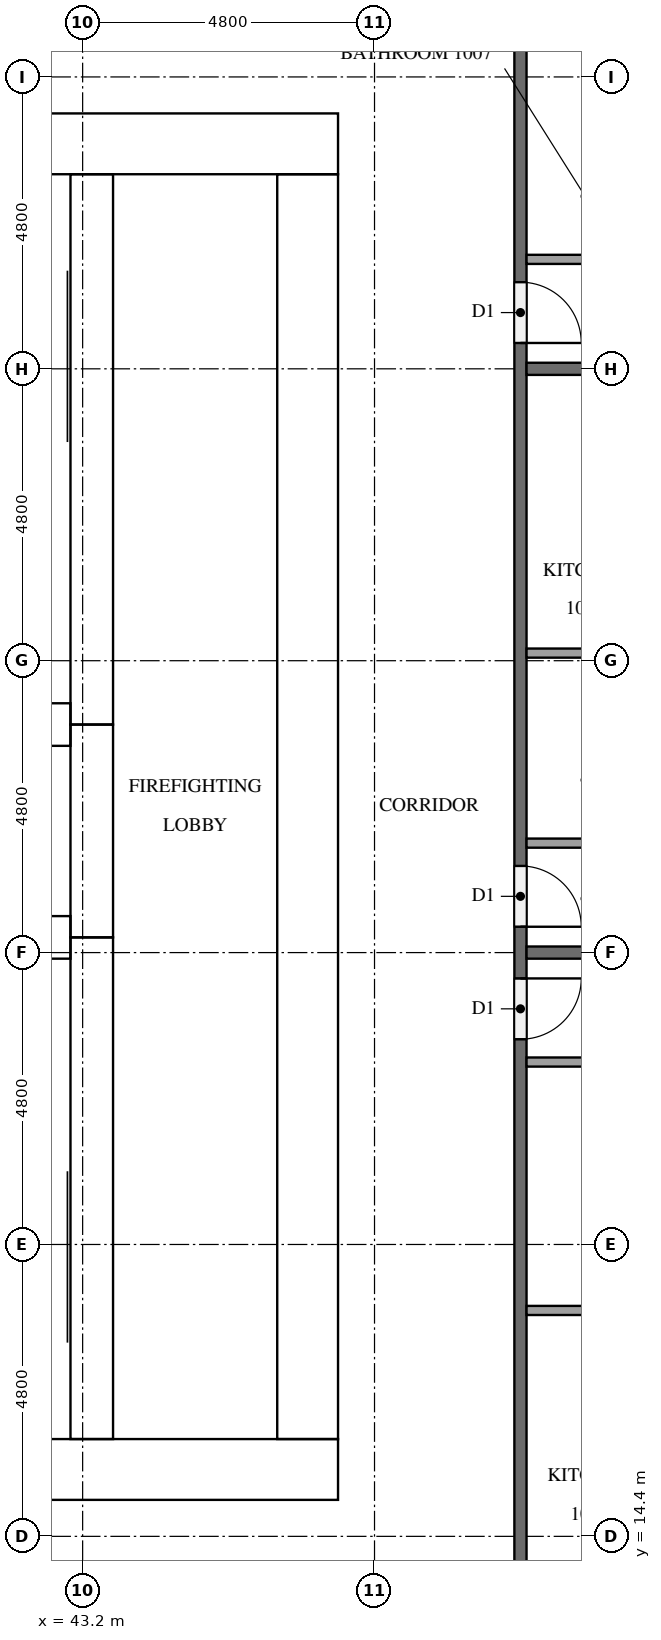
"""IFC4 building model, lengths in metres.
Left out: names, types, materials, properties, quantities, classifications, styles, units other than length and angle.
Written with IfcOpenShell. Run it as: python <this file> out.ifc"""

import sys

from ifc_helpers import new_model, si_unit, direction, frame, frame_2d, origin, place, context, subcontext, project, spatial, rectangle, extrude, element, fill, save


model = new_model("IFC4")
c1 = context("Model", 3, precision=1e-05, world=origin(), true_north=direction((0.0, 1.0)))
c2 = subcontext(c1, "Body", "Model", "MODEL_VIEW")
j1 = project(units=[si_unit("LENGTHUNIT", "METRE"), si_unit("PLANEANGLEUNIT", "RADIAN")], contexts=[c1])
p1 = place(None, origin())
s1 = spatial("IfcSite", under=j1, at=p1, CompositionType="ELEMENT")
p2 = place(p1, origin())
s2 = spatial("IfcBuilding", under=s1, at=p2, CompositionType="ELEMENT")
p3 = place(p2, frame((0.0, 0.0, 43.4)))
s3 = spatial("IfcBuildingStorey", under=s2, at=p3, CompositionType="ELEMENT", Elevation=43.4)
p4 = place(p3, frame((15.0, 15.5, 0.0), z_axis=(0.0, 0.0, 1.0), x_axis=(1.0, 0.0, 0.0)))
e1 = element("IfcWall", 1, at=p4, inside=s3, PredefinedType="SHEAR", context=c2, shape_type="SweptSolid", body=[
    extrude(rectangle(XDim=32.4, YDim=1.0, at=frame_2d((16.2, 0.0))), origin(), (0.0, 0.0, 1.0), 3.2),
])
p5 = place(p4, frame((15.3, 0.0, 0.0)))
e2 = element("IfcOpeningElement", 2, at=p5, cuts=e1, PredefinedType="OPENING", context=c2, shape_type="SweptSolid", body=[
    extrude(rectangle(XDim=1.8, YDim=2.1, at=frame_2d((0.9, 1.05))), frame((0.0, 0.51, 0.0), z_axis=(0.0, -1.0, 0.0), x_axis=(1.0, 0.0, 0.0)), (0.0, 0.0, 1.0), 1.02),
])
p6 = place(p3, frame((15.0, 37.3, 0.0), z_axis=(0.0, 0.0, 1.0), x_axis=(1.0, 0.0, 0.0)))
e3 = element("IfcWall", 3, at=p6, inside=s3, PredefinedType="SHEAR", context=c2, shape_type="SweptSolid", body=[
    extrude(rectangle(XDim=32.4, YDim=1.0, at=frame_2d((16.2, 0.0))), origin(), (0.0, 0.0, 1.0), 3.2),
])
p7 = place(p6, frame((15.3, 0.0, 0.0)))
e4 = element("IfcOpeningElement", 4, at=p7, cuts=e3, PredefinedType="OPENING", context=c2, shape_type="SweptSolid", body=[
    extrude(rectangle(XDim=1.8, YDim=2.1, at=frame_2d((0.9, 1.05))), frame((0.0, 0.51, 0.0), z_axis=(0.0, -1.0, 0.0), x_axis=(1.0, 0.0, 0.0)), (0.0, 0.0, 1.0), 1.02),
])
p8 = place(p6, frame((1.766, 0.0, 0.0)))
e5 = element("IfcOpeningElement", 5, at=p8, cuts=e3, PredefinedType="OPENING", context=c2, shape_type="SweptSolid", body=[
    extrude(rectangle(XDim=1.0, YDim=2.1, at=frame_2d((0.5, 1.05))), frame((0.0, 0.51, 0.0), z_axis=(0.0, -1.0, 0.0), x_axis=(1.0, 0.0, 0.0)), (0.0, 0.0, 1.0), 1.02),
])
p9 = place(p6, frame((5.241, 0.0, 0.0)))
e6 = element("IfcOpeningElement", 6, at=p9, cuts=e3, PredefinedType="OPENING", context=c2, shape_type="SweptSolid", body=[
    extrude(rectangle(XDim=1.0, YDim=2.1, at=frame_2d((0.5, 1.05))), frame((0.0, 0.51, 0.0), z_axis=(0.0, -1.0, 0.0), x_axis=(1.0, 0.0, 0.0)), (0.0, 0.0, 1.0), 1.02),
])
p10 = place(p3, frame((46.9, 16.0, 0.0), z_axis=(0.0, 0.0, 1.0), x_axis=(0.0, 1.0, 0.0)))
e7 = element("IfcWall", 7, at=p10, inside=s3, PredefinedType="SHEAR", context=c2, shape_type="SweptSolid", body=[
    extrude(rectangle(XDim=20.8, YDim=1.0, at=frame_2d((10.4, 0.0))), origin(), (0.0, 0.0, 1.0), 3.2),
])
p11 = place(p10, frame((10.1, 0.0, 0.0)))
e8 = element("IfcOpeningElement", 8, at=p11, cuts=e7, PredefinedType="OPENING", context=c2, shape_type="SweptSolid", body=[
    extrude(rectangle(XDim=1.2, YDim=2.1, at=frame_2d((0.6, 1.05))), frame((0.0, 0.51, 0.0), z_axis=(0.0, -1.0, 0.0), x_axis=(1.0, 0.0, 0.0)), (0.0, 0.0, 1.0), 1.02),
])
p12 = place(p3, frame((43.35, 16.0, 0.0), z_axis=(0.0, 0.0, 1.0), x_axis=(0.0, 1.0, 0.0)))
e9 = element("IfcWall", 9, at=p12, inside=s3, PredefinedType="SHEAR", context=c2, shape_type="SweptSolid", body=[
    extrude(rectangle(XDim=8.25, YDim=0.7, at=frame_2d((4.125, 0.0))), origin(), (0.0, 0.0, 1.0), 3.2),
])
p13 = place(p12, frame((0.2, 0.0, 0.0)))
e10 = element("IfcOpeningElement", 10, at=p13, cuts=e9, PredefinedType="OPENING", context=c2, shape_type="SweptSolid", body=[
    extrude(rectangle(XDim=1.2, YDim=2.1, at=frame_2d((0.6, 1.05))), frame((0.0, 0.36, 0.0), z_axis=(0.0, -1.0, 0.0), x_axis=(1.0, 0.0, 0.0)), (0.0, 0.0, 1.0), 0.72),
])
p14 = place(p3, frame((43.35, 24.25, 0.0), z_axis=(0.0, 0.0, 1.0), x_axis=(0.0, 1.0, 0.0)))
e11 = element("IfcWall", 11, at=p14, inside=s3, PredefinedType="SHEAR", context=c2, shape_type="SweptSolid", body=[
    extrude(rectangle(XDim=3.5, YDim=0.7, at=frame_2d((1.75, 0.0))), origin(), (0.0, 0.0, 1.0), 3.2),
])
p15 = place(p14, frame((1.2, 0.0, 0.0)))
e12 = element("IfcOpeningElement", 12, at=p15, cuts=e11, PredefinedType="OPENING", context=c2, shape_type="SweptSolid", body=[
    extrude(rectangle(XDim=1.1, YDim=2.1, at=frame_2d((0.55, 1.05))), frame((0.0, 0.36, 0.0), z_axis=(0.0, -1.0, 0.0), x_axis=(1.0, 0.0, 0.0)), (0.0, 0.0, 1.0), 0.72),
])
p16 = place(p3, frame((43.35, 27.75, 0.0), z_axis=(0.0, 0.0, 1.0), x_axis=(0.0, 1.0, 0.0)))
e13 = element("IfcWall", 13, at=p16, inside=s3, PredefinedType="SHEAR", context=c2, shape_type="SweptSolid", body=[
    extrude(rectangle(XDim=9.05, YDim=0.7, at=frame_2d((4.525, 0.0))), origin(), (0.0, 0.0, 1.0), 3.2),
])
p17 = place(p16, frame((7.65, 0.0, 0.0)))
e14 = element("IfcOpeningElement", 14, at=p17, cuts=e13, PredefinedType="OPENING", context=c2, shape_type="SweptSolid", body=[
    extrude(rectangle(XDim=1.2, YDim=2.1, at=frame_2d((0.6, 1.05))), frame((0.0, 0.36, 0.0), z_axis=(0.0, -1.0, 0.0), x_axis=(1.0, 0.0, 0.0)), (0.0, 0.0, 1.0), 0.72),
])
for number, where, z_axis, x_axis in (
    (15, (39.65, 24.25, 0.0), (0.0, 0.0, 1.0), (1.0, 0.0, 0.0)),
    (16, (39.65, 27.75, 0.0), (0.0, 0.0, 1.0), (1.0, 0.0, 0.0)),
):
    element("IfcWall", number, at=place(p3, frame(where, z_axis=z_axis, x_axis=x_axis)), inside=s3, PredefinedType="SHEAR", context=c2, shape_type="SweptSolid", body=[
        extrude(rectangle(XDim=3.35, YDim=0.7, at=frame_2d((1.675, 0.0))), origin(), (0.0, 0.0, 1.0), 3.2),
    ])
p18 = place(p3, frame((50.4, 40.7, 0.0), z_axis=(0.0, 0.0, 1.0), x_axis=(0.0, -1.0, 0.0)))
e17 = element("IfcWall", 17, at=p18, inside=s3, PredefinedType="PARTITIONING", context=c2, shape_type="SweptSolid", body=[
    extrude(rectangle(XDim=28.6, YDim=0.2, at=frame_2d((14.3, 0.0))), origin(), (0.0, 0.0, 1.0), 3.2),
])
p19 = place(p18, frame((17.125, 0.0, 0.0)))
e18 = element("IfcOpeningElement", 18, at=p19, cuts=e17, PredefinedType="OPENING", context=c2, shape_type="SweptSolid", body=[
    extrude(rectangle(XDim=1.0, YDim=2.1, at=frame_2d((0.5, 1.05))), frame((0.0, 0.11, 0.0), z_axis=(0.0, -1.0, 0.0), x_axis=(1.0, 0.0, 0.0)), (0.0, 0.0, 1.0), 0.22),
])
p20 = place(p18, frame((15.275, 0.0, 0.0)))
e19 = element("IfcOpeningElement", 19, at=p20, cuts=e17, PredefinedType="OPENING", context=c2, shape_type="SweptSolid", body=[
    extrude(rectangle(XDim=1.0, YDim=2.1, at=frame_2d((0.5, 1.05))), frame((0.0, 0.11, 0.0), z_axis=(0.0, -1.0, 0.0), x_axis=(1.0, 0.0, 0.0)), (0.0, 0.0, 1.0), 0.22),
])
p21 = place(p18, frame((5.675, 0.0, 0.0)))
e20 = element("IfcOpeningElement", 20, at=p21, cuts=e17, PredefinedType="OPENING", context=c2, shape_type="SweptSolid", body=[
    extrude(rectangle(XDim=1.0, YDim=2.1, at=frame_2d((0.5, 1.05))), frame((0.0, 0.11, 0.0), z_axis=(0.0, -1.0, 0.0), x_axis=(1.0, 0.0, 0.0)), (0.0, 0.0, 1.0), 0.22),
])
for number, where, z_axis, x_axis in (
    (21, (50.5, 24.0, 0.0), (0.0, 0.0, 1.0), (1.0, 0.0, 0.0)),
    (22, (50.5, 33.6, 0.0), (0.0, 0.0, 1.0), (1.0, 0.0, 0.0)),
):
    element("IfcWall", number, at=place(p3, frame(where, z_axis=z_axis, x_axis=x_axis)), inside=s3, PredefinedType="PARTITIONING", context=c2, shape_type="SweptSolid", body=[
        extrude(rectangle(XDim=6.65, YDim=0.2, at=frame_2d((3.325, 0.0))), origin(), (0.0, 0.0, 1.0), 3.2),
    ])
p22 = place(p3, frame((50.5, 18.115, 0.0), z_axis=(0.0, 0.0, 1.0), x_axis=(1.0, 0.0, 0.0)))
e23 = element("IfcWall", 23, at=p22, inside=s3, PredefinedType="PARTITIONING", context=c2, shape_type="SweptSolid", body=[
    extrude(rectangle(XDim=2.075, YDim=0.15, at=frame_2d((1.038, 0.0))), origin(), (0.0, 0.0, 1.0), 3.2),
])
p23 = place(p3, frame((50.5, 22.2, 0.0), z_axis=(0.0, 0.0, 1.0), x_axis=(1.0, 0.0, 0.0)))
e24 = element("IfcWall", 24, at=p23, inside=s3, PredefinedType="PARTITIONING", context=c2, shape_type="SweptSolid", body=[
    extrude(rectangle(XDim=2.225, YDim=0.15, at=frame_2d((1.113, 0.0))), origin(), (0.0, 0.0, 1.0), 3.2),
])
p24 = place(p3, frame((50.5, 28.925, 0.0), z_axis=(0.0, 0.0, 1.0), x_axis=(1.0, 0.0, 0.0)))
e25 = element("IfcWall", 25, at=p24, inside=s3, PredefinedType="PARTITIONING", context=c2, shape_type="SweptSolid", body=[
    extrude(rectangle(XDim=1.925, YDim=0.15, at=frame_2d((0.962, 0.0))), origin(), (0.0, 0.0, 1.0), 3.2),
])
for number, where, z_axis, x_axis in (
    (26, (50.5, 25.8, 0.0), (0.0, 0.0, 1.0), (1.0, 0.0, 0.0)),
    (27, (50.5, 35.4, 0.0), (0.0, 0.0, 1.0), (1.0, 0.0, 0.0)),
):
    element("IfcWall", number, at=place(p3, frame(where, z_axis=z_axis, x_axis=x_axis)), inside=s3, PredefinedType="PARTITIONING", context=c2, shape_type="SweptSolid", body=[
        extrude(rectangle(XDim=2.075, YDim=0.15, at=frame_2d((1.038, 0.0))), origin(), (0.0, 0.0, 1.0), 3.2),
    ])
p25 = place(p15, origin())
e28 = element("IfcDoor", 28, at=p25, inside=s3, OperationType="DOUBLE_DOOR_SLIDING", PredefinedType="DOOR", context=c2, shape_type="SweptSolid", body=[
    extrude(rectangle(XDim=1.1, YDim=2.1, at=frame_2d((0.55, 1.05))), frame((0.0, 0.025, 0.0), z_axis=(0.0, -1.0, 0.0), x_axis=(1.0, 0.0, 0.0)), (0.0, 0.0, 1.0), 0.05),
])
fill(e12, e28)
p26 = place(p13, origin())
e29 = element("IfcDoor", 29, at=p26, inside=s3, OperationType="SINGLE_SWING_LEFT", PredefinedType="DOOR", context=c2, shape_type="SweptSolid", body=[
    extrude(rectangle(XDim=1.2, YDim=2.1, at=frame_2d((0.6, 1.05))), frame((0.0, 0.025, 0.0), z_axis=(0.0, -1.0, 0.0), x_axis=(1.0, 0.0, 0.0)), (0.0, 0.0, 1.0), 0.05),
])
fill(e10, e29)
p27 = place(p17, origin())
e30 = element("IfcDoor", 30, at=p27, inside=s3, OperationType="SINGLE_SWING_RIGHT", PredefinedType="DOOR", context=c2, shape_type="SweptSolid", body=[
    extrude(rectangle(XDim=1.2, YDim=2.1, at=frame_2d((0.6, 1.05))), frame((0.0, 0.025, 0.0), z_axis=(0.0, -1.0, 0.0), x_axis=(1.0, 0.0, 0.0)), (0.0, 0.0, 1.0), 0.05),
])
fill(e14, e30)
p28 = place(p11, origin())
e31 = element("IfcDoor", 31, at=p28, inside=s3, OperationType="SINGLE_SWING_RIGHT", PredefinedType="DOOR", context=c2, shape_type="SweptSolid", body=[
    extrude(rectangle(XDim=1.2, YDim=2.1, at=frame_2d((0.6, 1.05))), frame((0.0, 0.025, 0.0), z_axis=(0.0, -1.0, 0.0), x_axis=(1.0, 0.0, 0.0)), (0.0, 0.0, 1.0), 0.05),
])
fill(e8, e31)
p29 = place(p19, origin())
e32 = element("IfcDoor", 32, at=p29, inside=s3, OperationType="SINGLE_SWING_LEFT", PredefinedType="DOOR", context=c2, shape_type="SweptSolid", body=[
    extrude(rectangle(XDim=1.0, YDim=2.1, at=frame_2d((0.5, 1.05))), frame((0.0, 0.025, 0.0), z_axis=(0.0, -1.0, 0.0), x_axis=(1.0, 0.0, 0.0)), (0.0, 0.0, 1.0), 0.05),
])
fill(e18, e32)
p30 = place(p20, origin())
e33 = element("IfcDoor", 33, at=p30, inside=s3, OperationType="SINGLE_SWING_RIGHT", PredefinedType="DOOR", context=c2, shape_type="SweptSolid", body=[
    extrude(rectangle(XDim=1.0, YDim=2.1, at=frame_2d((0.5, 1.05))), frame((0.0, 0.025, 0.0), z_axis=(0.0, -1.0, 0.0), x_axis=(1.0, 0.0, 0.0)), (0.0, 0.0, 1.0), 0.05),
])
fill(e19, e33)
p31 = place(p21, origin())
e34 = element("IfcDoor", 34, at=p31, inside=s3, OperationType="SINGLE_SWING_RIGHT", PredefinedType="DOOR", context=c2, shape_type="SweptSolid", body=[
    extrude(rectangle(XDim=1.0, YDim=2.1, at=frame_2d((0.5, 1.05))), frame((0.0, 0.025, 0.0), z_axis=(0.0, -1.0, 0.0), x_axis=(1.0, 0.0, 0.0)), (0.0, 0.0, 1.0), 0.05),
])
fill(e20, e34)
save(model, sys.argv[1])
